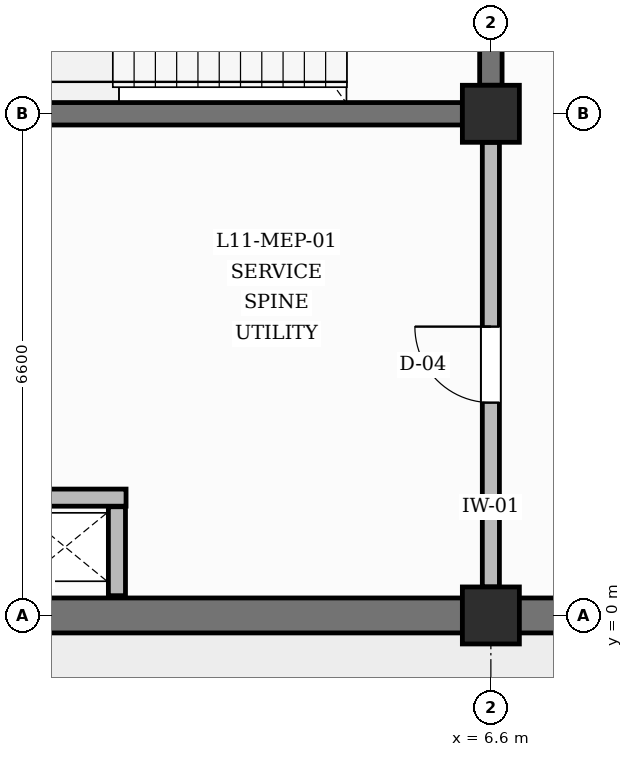
"""IFC4 building model, lengths in metres.
Left out: names, types, materials, properties, quantities, classifications, styles, units other than length and angle.
Written with IfcOpenShell. Run it as: python <this file> out.ifc"""

import sys

from ifc_helpers import new_model, si_unit, direction, frame, frame_2d, origin, origin_2d, place, context, subcontext, project, spatial, rectangle, extrude, element, fill, save


model = new_model("IFC4")
c1 = context("Model", 3, precision=1e-05, world=origin(), true_north=direction((0.0, 1.0)))
c2 = subcontext(c1, "Body", "Model", "MODEL_VIEW")
j1 = project(units=[si_unit("LENGTHUNIT", "METRE"), si_unit("PLANEANGLEUNIT", "RADIAN")], contexts=[c1])
p1 = place(None, origin())
s1 = spatial("IfcSite", under=j1, at=p1, CompositionType="ELEMENT")
p2 = place(p1, origin())
s2 = spatial("IfcBuilding", under=s1, at=p2, CompositionType="ELEMENT")
p3 = place(p2, frame((0.0, 0.0, 48.0)))
s3 = spatial("IfcBuildingStorey", under=s2, at=p3, CompositionType="ELEMENT", Elevation=48.0)
for number, where, z_axis, x_axis in (
    (1, (6.6, 0.0, 0.0), (0.0, 0.0, 1.0), (1.0, 0.0, 0.0)),
    (2, (6.6, 6.6, 0.0), (0.0, 0.0, 1.0), (1.0, 0.0, 0.0)),
):
    element("IfcColumn", number, at=place(p3, frame(where, z_axis=z_axis, x_axis=x_axis)), inside=s3, PredefinedType="COLUMN", context=c2, shape_type="SweptSolid", body=[
        extrude(rectangle(XDim=0.75, YDim=0.75, at=origin_2d()), origin(), (0.0, 0.0, 1.0), 4.2),
    ])
p4 = place(p3, frame((0.375, 0.0, 0.0), z_axis=(0.0, 0.0, 1.0), x_axis=(1.0, 0.0, 0.0)))
e3 = element("IfcWall", 3, at=p4, inside=s3, PredefinedType="SOLIDWALL", context=c2, shape_type="SweptSolid", body=[
    extrude(rectangle(XDim=5.85, YDim=0.46, at=frame_2d((2.925, 0.0))), origin(), (0.0, 0.0, 1.0), 3.29),
])
p5 = place(p3, frame((6.975, 0.0, 0.0), z_axis=(0.0, 0.0, 1.0), x_axis=(1.0, 0.0, 0.0)))
e4 = element("IfcWall", 4, at=p5, inside=s3, PredefinedType="SOLIDWALL", context=c2, shape_type="SweptSolid", body=[
    extrude(rectangle(XDim=5.85, YDim=0.46, at=frame_2d((2.925, 0.0))), origin(), (0.0, 0.0, 1.0), 3.29),
])
p6 = place(p3, frame((0.375, 6.6, 0.0), z_axis=(0.0, 0.0, 1.0), x_axis=(1.0, 0.0, 0.0)))
e5 = element("IfcWall", 5, at=p6, inside=s3, PredefinedType="SHEAR", context=c2, shape_type="SweptSolid", body=[
    extrude(rectangle(XDim=5.85, YDim=0.295, at=frame_2d((2.925, 0.0))), origin(), (0.0, 0.0, 1.0), 3.29),
])
p7 = place(p3, frame((6.6, 6.975, 0.0), z_axis=(0.0, 0.0, 1.0), x_axis=(0.0, 1.0, 0.0)))
e6 = element("IfcWall", 6, at=p7, inside=s3, PredefinedType="SHEAR", context=c2, shape_type="SweptSolid", body=[
    extrude(rectangle(XDim=5.85, YDim=0.295, at=frame_2d((2.925, 0.0))), origin(), (0.0, 0.0, 1.0), 3.29),
])
p8 = place(p7, frame((2.375, 0.0, 0.0)))
e7 = element("IfcOpeningElement", 7, at=p8, cuts=e6, PredefinedType="OPENING", context=c2, shape_type="SweptSolid", body=[
    extrude(rectangle(XDim=1.1, YDim=2.15, at=frame_2d((0.55, 1.075))), frame((0.0, 0.157, 0.0), z_axis=(0.0, -1.0, 0.0), x_axis=(1.0, 0.0, 0.0)), (0.0, 0.0, 1.0), 0.315),
])
p9 = place(p3, frame((1.68, 0.26, 0.0), z_axis=(0.0, 0.0, 1.0), x_axis=(0.0, 1.0, 0.0)))
e8 = element("IfcWall", 8, at=p9, inside=s3, PredefinedType="PARTITIONING", context=c2, shape_type="SweptSolid", body=[
    extrude(rectangle(XDim=1.17, YDim=0.225, at=frame_2d((0.585, 0.0))), origin(), (0.0, 0.0, 1.0), 3.89),
])
p10 = place(p3, frame((0.26, 1.55, 0.0), z_axis=(0.0, 0.0, 1.0), x_axis=(1.0, 0.0, 0.0)))
e9 = element("IfcWall", 9, at=p10, inside=s3, PredefinedType="PARTITIONING", context=c2, shape_type="SweptSolid", body=[
    extrude(rectangle(XDim=1.54, YDim=0.225, at=frame_2d((0.77, 0.0))), origin(), (0.0, 0.0, 1.0), 3.89),
])
p11 = place(p3, frame((6.6, 0.375, 0.0), z_axis=(0.0, 0.0, 1.0), x_axis=(0.0, 1.0, 0.0)))
e10 = element("IfcWall", 10, at=p11, inside=s3, PredefinedType="PARTITIONING", context=c2, shape_type="SweptSolid", body=[
    extrude(rectangle(XDim=5.85, YDim=0.225, at=frame_2d((2.925, 0.0))), origin(), (0.0, 0.0, 1.0), 3.29),
])
p12 = place(p11, frame((2.425, 0.0, 0.0)))
e11 = element("IfcOpeningElement", 11, at=p12, cuts=e10, PredefinedType="OPENING", context=c2, shape_type="SweptSolid", body=[
    extrude(rectangle(XDim=1.0, YDim=2.1, at=frame_2d((0.5, 1.05))), frame((0.0, 0.123, 0.0), z_axis=(0.0, -1.0, 0.0), x_axis=(1.0, 0.0, 0.0)), (0.0, 0.0, 1.0), 0.245),
])
p13 = place(p12, origin())
e12 = element("IfcDoor", 12, at=p13, inside=s3, OperationType="SINGLE_SWING_RIGHT", PredefinedType="DOOR", context=c2, shape_type="SweptSolid", body=[
    extrude(rectangle(XDim=1.0, YDim=2.1, at=frame_2d((0.5, 1.05))), frame((0.0, 0.025, 0.0), z_axis=(0.0, -1.0, 0.0), x_axis=(1.0, 0.0, 0.0)), (0.0, 0.0, 1.0), 0.05),
])
fill(e11, e12)
save(model, sys.argv[1])
